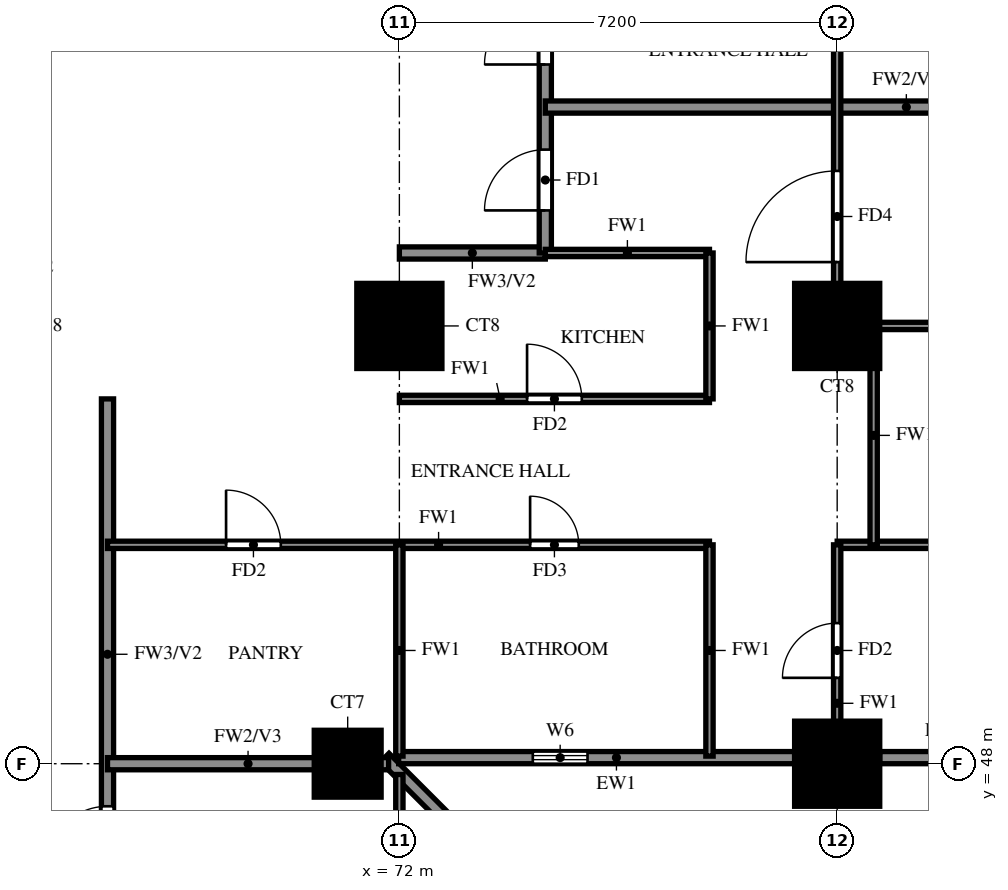
"""IFC4 building model, lengths in metres.
Left out: names, types, materials, properties, quantities, classifications, styles, units other than length and angle.
Written with IfcOpenShell. Run it as: python <this file> out.ifc"""

import sys

from ifc_helpers import new_model, si_unit, direction, frame, frame_2d, origin, origin_2d, place, context, subcontext, project, spatial, rectangle, extrude, source, transform, mapped, element, fill, save


model = new_model("IFC4")
c1 = context("Model", 3, precision=1e-05, world=origin(), true_north=direction((0.0, 1.0)))
c2 = subcontext(c1, "Body", "Model", "MODEL_VIEW")
j1 = project(units=[si_unit("LENGTHUNIT", "METRE"), si_unit("PLANEANGLEUNIT", "RADIAN")], contexts=[c1])
p1 = place(None, origin())
s1 = spatial("IfcSite", under=j1, at=p1, CompositionType="ELEMENT")
p2 = place(p1, origin())
s2 = spatial("IfcBuilding", under=s1, at=p2, CompositionType="ELEMENT")
p3 = place(p2, frame((0.0, 0.0, 34.0)))
s3 = spatial("IfcBuildingStorey", under=s2, at=p3, CompositionType="ELEMENT", Elevation=34.0)
m1 = source(origin(), c2, "Body", "SweptSolid", [
    extrude(rectangle(XDim=1.1, YDim=1.1, at=origin_2d()), origin(), (0.0, 0.0, 1.0), 3.18),
])
p4 = place(p3, frame((71.15, 48.0, 0.0), z_axis=(0.0, 0.0, 1.0), x_axis=(1.0, 0.0, 0.0)))
e1 = element("IfcColumn", 1, at=p4, inside=s3, PredefinedType="COLUMN", context=c2, shape_type="MappedRepresentation", body=[
    mapped(m1, transform((0.0, 0.0, 0.0))),
])
m2 = source(origin(), c2, "Body", "SweptSolid", [
    extrude(rectangle(XDim=1.4, YDim=1.4, at=origin_2d()), origin(), (0.0, 0.0, 1.0), 3.18),
])
for number, where, z_axis, x_axis in (
    (2, (79.2, 48.0, 0.0), (0.0, 0.0, 1.0), (1.0, 0.0, 0.0)),
    (3, (72.0, 55.2, 0.0), (0.0, 0.0, 1.0), (1.0, 0.0, 0.0)),
    (4, (79.2, 55.2, 0.0), (0.0, 0.0, 1.0), (1.0, 0.0, 0.0)),
):
    element("IfcColumn", number, at=place(p3, frame(where, z_axis=z_axis, x_axis=x_axis)), inside=s3, PredefinedType="COLUMN", context=c2, shape_type="MappedRepresentation", body=[
        mapped(m2, transform((0.0, 0.0, 0.0))),
    ])
p5 = place(p3, frame((78.74, 41.118, 0.0), z_axis=(0.0, 0.0, 1.0), x_axis=(-0.707106781187, 0.707106781187, 0.0)))
e5 = element("IfcWall", 5, at=p5, inside=s3, PredefinedType="SOLIDWALL", context=c2, shape_type="SweptSolid", body=[
    extrude(rectangle(XDim=9.874, YDim=0.2, at=frame_2d((4.937, 0.0))), origin(), (0.0, 0.0, 1.0), 3.18),
])
p6 = place(p3, frame((71.989, 48.1, 0.0), z_axis=(0.0, 0.0, 1.0), x_axis=(1.0, 0.0, 0.0)))
e6 = element("IfcWall", 6, at=p6, inside=s3, PredefinedType="SOLIDWALL", context=c2, shape_type="SweptSolid", body=[
    extrude(rectangle(XDim=6.511, YDim=0.2, at=frame_2d((3.256, 0.0))), origin(), (0.0, 0.0, 1.0), 3.18),
])
p7 = place(p6, frame((2.206, 0.0, 1.5)))
e7 = element("IfcOpeningElement", 7, at=p7, cuts=e6, PredefinedType="OPENING", context=c2, shape_type="SweptSolid", body=[
    extrude(rectangle(XDim=0.9, YDim=0.9, at=frame_2d((0.45, 0.45))), frame((0.0, 0.11, 0.0), z_axis=(0.0, -1.0, 0.0), x_axis=(1.0, 0.0, 0.0)), (0.0, 0.0, 1.0), 0.22),
])
p8 = place(p3, frame((79.9, 48.1, 0.0), z_axis=(0.0, 0.0, 1.0), x_axis=(1.0, 0.0, 0.0)))
e8 = element("IfcWall", 8, at=p8, inside=s3, PredefinedType="SOLIDWALL", context=c2, shape_type="SweptSolid", body=[
    extrude(rectangle(XDim=5.35, YDim=0.2, at=frame_2d((2.675, 0.0))), origin(), (0.0, 0.0, 1.0), 3.18),
])
p9 = place(p8, frame((1.475, 0.0, 0.6)))
e9 = element("IfcOpeningElement", 9, at=p9, cuts=e8, PredefinedType="OPENING", context=c2, shape_type="SweptSolid", body=[
    extrude(rectangle(XDim=2.4, YDim=2.4, at=frame_2d((1.2, 1.2))), frame((0.0, 0.11, 0.0), z_axis=(0.0, -1.0, 0.0), x_axis=(1.0, 0.0, 0.0)), (0.0, 0.0, 1.0), 0.22),
])
p10 = place(p3, frame((72.0, 56.4, 0.0), z_axis=(0.0, 0.0, 1.0), x_axis=(1.0, 0.0, 0.0)))
e10 = element("IfcWall", 10, at=p10, inside=s3, PredefinedType="SOLIDWALL", context=c2, shape_type="SweptSolid", body=[
    extrude(rectangle(XDim=2.4, YDim=0.2, at=frame_2d((1.2, 0.0))), origin(), (0.0, 0.0, 1.0), 3.18),
])
p11 = place(p3, frame((67.2, 45.6, 0.0), z_axis=(0.0, 0.0, 1.0), x_axis=(0.0, 1.0, 0.0)))
e11 = element("IfcWall", 11, at=p11, inside=s3, PredefinedType="SOLIDWALL", context=c2, shape_type="SweptSolid", body=[
    extrude(rectangle(XDim=8.4, YDim=0.2, at=frame_2d((4.2, 0.0))), origin(), (0.0, 0.0, 1.0), 3.18),
])
p12 = place(p11, frame((0.7, 0.0, 0.0)))
e12 = element("IfcOpeningElement", 12, at=p12, cuts=e11, PredefinedType="OPENING", context=c2, shape_type="SweptSolid", body=[
    extrude(rectangle(XDim=1.0, YDim=2.1, at=frame_2d((0.5, 1.05))), frame((0.0, 0.11, 0.0), z_axis=(0.0, -1.0, 0.0), x_axis=(1.0, 0.0, 0.0)), (0.0, 0.0, 1.0), 0.22),
])
p13 = place(p3, frame((74.4, 56.4, 0.0), z_axis=(0.0, 0.0, 1.0), x_axis=(0.0, 1.0, 0.0)))
e13 = element("IfcWall", 13, at=p13, inside=s3, PredefinedType="SOLIDWALL", context=c2, shape_type="SweptSolid", body=[
    extrude(rectangle(XDim=9.6, YDim=0.2, at=frame_2d((4.8, 0.0))), origin(), (0.0, 0.0, 1.0), 3.18),
])
p14 = place(p13, frame((0.7, 0.0, 0.0)))
e14 = element("IfcOpeningElement", 14, at=p14, cuts=e13, PredefinedType="OPENING", context=c2, shape_type="SweptSolid", body=[
    extrude(rectangle(XDim=1.0, YDim=2.1, at=frame_2d((0.5, 1.05))), frame((0.0, 0.11, 0.0), z_axis=(0.0, -1.0, 0.0), x_axis=(1.0, 0.0, 0.0)), (0.0, 0.0, 1.0), 0.22),
])
p15 = place(p13, frame((3.1, 0.0, 0.0)))
e15 = element("IfcOpeningElement", 15, at=p15, cuts=e13, PredefinedType="OPENING", context=c2, shape_type="SweptSolid", body=[
    extrude(rectangle(XDim=1.0, YDim=2.1, at=frame_2d((0.5, 1.05))), frame((0.0, 0.11, 0.0), z_axis=(0.0, -1.0, 0.0), x_axis=(1.0, 0.0, 0.0)), (0.0, 0.0, 1.0), 0.22),
])
p16 = place(p3, frame((67.2, 48.0, 0.0), z_axis=(0.0, 0.0, 1.0), x_axis=(1.0, 0.0, 0.0)))
e16 = element("IfcWall", 16, at=p16, inside=s3, PredefinedType="SOLIDWALL", context=c2, shape_type="SweptSolid", body=[
    extrude(rectangle(XDim=4.623, YDim=0.2, at=frame_2d((2.312, 0.0))), origin(), (0.0, 0.0, 1.0), 3.18),
])
p17 = place(p3, frame((74.4, 58.8, 0.0), z_axis=(0.0, 0.0, 1.0), x_axis=(1.0, 0.0, 0.0)))
e17 = element("IfcWall", 17, at=p17, inside=s3, PredefinedType="SOLIDWALL", context=c2, shape_type="SweptSolid", body=[
    extrude(rectangle(XDim=11.875, YDim=0.2, at=frame_2d((5.938, 0.0))), origin(), (0.0, 0.0, 1.0), 2.28),
])
p18 = place(p3, frame((67.2, 51.6, 0.0), z_axis=(0.0, 0.0, 1.0), x_axis=(1.0, 0.0, 0.0)))
e18 = element("IfcWall", 18, at=p18, inside=s3, PredefinedType="PARTITIONING", context=c2, shape_type="SweptSolid", body=[
    extrude(rectangle(XDim=9.9, YDim=0.12, at=frame_2d((4.95, 0.0))), origin(), (0.0, 0.0, 1.0), 3.18),
])
p19 = place(p18, frame((6.95, 0.0, 0.0)))
e19 = element("IfcOpeningElement", 19, at=p19, cuts=e18, PredefinedType="OPENING", context=c2, shape_type="SweptSolid", body=[
    extrude(rectangle(XDim=0.8, YDim=2.1, at=frame_2d((0.4, 1.05))), frame((0.0, 0.07, 0.0), z_axis=(0.0, -1.0, 0.0), x_axis=(1.0, 0.0, 0.0)), (0.0, 0.0, 1.0), 0.14),
])
p20 = place(p18, frame((1.95, 0.0, 0.0)))
e20 = element("IfcOpeningElement", 20, at=p20, cuts=e18, PredefinedType="OPENING", context=c2, shape_type="SweptSolid", body=[
    extrude(rectangle(XDim=0.9, YDim=2.1, at=frame_2d((0.45, 1.05))), frame((0.0, 0.07, 0.0), z_axis=(0.0, -1.0, 0.0), x_axis=(1.0, 0.0, 0.0)), (0.0, 0.0, 1.0), 0.14),
])
p21 = place(p3, frame((79.2, 51.6, 0.0), z_axis=(0.0, 0.0, 1.0), x_axis=(1.0, 0.0, 0.0)))
e21 = element("IfcWall", 21, at=p21, inside=s3, PredefinedType="PARTITIONING", context=c2, shape_type="SweptSolid", body=[
    extrude(rectangle(XDim=7.075, YDim=0.12, at=frame_2d((3.538, 0.0))), origin(), (0.0, 0.0, 1.0), 2.28),
])
p22 = place(p21, frame((3.438, 0.0, 0.0)))
e22 = element("IfcOpeningElement", 22, at=p22, cuts=e21, PredefinedType="OPENING", context=c2, shape_type="SweptSolid", body=[
    extrude(rectangle(XDim=0.8, YDim=2.1, at=frame_2d((0.4, 1.05))), frame((0.0, 0.07, 0.0), z_axis=(0.0, -1.0, 0.0), x_axis=(1.0, 0.0, 0.0)), (0.0, 0.0, 1.0), 0.14),
])
p23 = place(p3, frame((72.0, 54.0, 0.0), z_axis=(0.0, 0.0, 1.0), x_axis=(1.0, 0.0, 0.0)))
e23 = element("IfcWall", 23, at=p23, inside=s3, PredefinedType="PARTITIONING", context=c2, shape_type="SweptSolid", body=[
    extrude(rectangle(XDim=5.1, YDim=0.12, at=frame_2d((2.55, 0.0))), origin(), (0.0, 0.0, 1.0), 3.18),
])
p24 = place(p23, frame((2.1, 0.0, 0.0)))
e24 = element("IfcOpeningElement", 24, at=p24, cuts=e23, PredefinedType="OPENING", context=c2, shape_type="SweptSolid", body=[
    extrude(rectangle(XDim=0.9, YDim=2.1, at=frame_2d((0.45, 1.05))), frame((0.0, 0.07, 0.0), z_axis=(0.0, -1.0, 0.0), x_axis=(1.0, 0.0, 0.0)), (0.0, 0.0, 1.0), 0.14),
])
p25 = place(p3, frame((79.2, 55.2, 0.0), z_axis=(0.0, 0.0, 1.0), x_axis=(1.0, 0.0, 0.0)))
e25 = element("IfcWall", 25, at=p25, inside=s3, PredefinedType="PARTITIONING", context=c2, shape_type="SweptSolid", body=[
    extrude(rectangle(XDim=7.075, YDim=0.12, at=frame_2d((3.538, 0.0))), origin(), (0.0, 0.0, 1.0), 3.18),
])
p26 = place(p3, frame((74.4, 56.4, 0.0), z_axis=(0.0, 0.0, 1.0), x_axis=(1.0, 0.0, 0.0)))
e26 = element("IfcWall", 26, at=p26, inside=s3, PredefinedType="PARTITIONING", context=c2, shape_type="SweptSolid", body=[
    extrude(rectangle(XDim=2.7, YDim=0.12, at=frame_2d((1.35, 0.0))), origin(), (0.0, 0.0, 1.0), 3.18),
])
p27 = place(p3, frame((72.0, 33.725, 0.0), z_axis=(0.0, 0.0, 1.0), x_axis=(0.0, 1.0, 0.0)))
e27 = element("IfcWall", 27, at=p27, inside=s3, PredefinedType="PARTITIONING", context=c2, shape_type="SweptSolid", body=[
    extrude(rectangle(XDim=14.098, YDim=0.12, at=frame_2d((7.049, 0.0))), origin(), (0.0, 0.0, 1.0), 2.28),
])
p28 = place(p27, frame((10.075, 0.0, 0.0)))
e28 = element("IfcOpeningElement", 28, at=p28, cuts=e27, PredefinedType="OPENING", context=c2, shape_type="SweptSolid", body=[
    extrude(rectangle(XDim=0.9, YDim=2.1, at=frame_2d((0.45, 1.05))), frame((0.0, 0.07, 0.0), z_axis=(0.0, -1.0, 0.0), x_axis=(1.0, 0.0, 0.0)), (0.0, 0.0, 1.0), 0.14),
])
for number, where, z_axis, x_axis in (
    (29, (72.0, 48.125, 0.0), (0.0, 0.0, 1.0), (0.0, 1.0, 0.0)),
    (30, (77.1, 48.125, 0.0), (0.0, 0.0, 1.0), (0.0, 1.0, 0.0)),
):
    element("IfcWall", number, at=place(p3, frame(where, z_axis=z_axis, x_axis=x_axis)), inside=s3, PredefinedType="PARTITIONING", context=c2, shape_type="SweptSolid", body=[
        extrude(rectangle(XDim=3.475, YDim=0.12, at=frame_2d((1.738, 0.0))), origin(), (0.0, 0.0, 1.0), 3.18),
    ])
p29 = place(p3, frame((77.1, 54.0, 0.0), z_axis=(0.0, 0.0, 1.0), x_axis=(0.0, 1.0, 0.0)))
e31 = element("IfcWall", 31, at=p29, inside=s3, PredefinedType="PARTITIONING", context=c2, shape_type="SweptSolid", body=[
    extrude(rectangle(XDim=2.4, YDim=0.12, at=frame_2d((1.2, 0.0))), origin(), (0.0, 0.0, 1.0), 3.18),
])
p30 = place(p3, frame((79.2, 48.125, 0.0), z_axis=(0.0, 0.0, 1.0), x_axis=(0.0, 1.0, 0.0)))
e32 = element("IfcWall", 32, at=p30, inside=s3, PredefinedType="PARTITIONING", context=c2, shape_type="SweptSolid", body=[
    extrude(rectangle(XDim=3.475, YDim=0.12, at=frame_2d((1.738, 0.0))), origin(), (0.0, 0.0, 1.0), 3.18),
])
p31 = place(p30, frame((1.288, 0.0, 0.0)))
e33 = element("IfcOpeningElement", 33, at=p31, cuts=e32, PredefinedType="OPENING", context=c2, shape_type="SweptSolid", body=[
    extrude(rectangle(XDim=0.9, YDim=2.1, at=frame_2d((0.45, 1.05))), frame((0.0, 0.07, 0.0), z_axis=(0.0, -1.0, 0.0), x_axis=(1.0, 0.0, 0.0)), (0.0, 0.0, 1.0), 0.14),
])
p32 = place(p3, frame((79.2, 55.2, 0.0), z_axis=(0.0, 0.0, 1.0), x_axis=(0.0, 1.0, 0.0)))
e34 = element("IfcWall", 34, at=p32, inside=s3, PredefinedType="PARTITIONING", context=c2, shape_type="SweptSolid", body=[
    extrude(rectangle(XDim=18.0, YDim=0.12, at=frame_2d((9.0, 0.0))), origin(), (0.0, 0.0, 1.0), 3.18),
])
p33 = place(p32, frame((1.05, 0.0, 0.0)))
e35 = element("IfcOpeningElement", 35, at=p33, cuts=e34, PredefinedType="OPENING", context=c2, shape_type="SweptSolid", body=[
    extrude(rectangle(XDim=1.5, YDim=2.1, at=frame_2d((0.75, 1.05))), frame((0.0, 0.07, 0.0), z_axis=(0.0, -1.0, 0.0), x_axis=(1.0, 0.0, 0.0)), (0.0, 0.0, 1.0), 0.14),
])
p34 = place(p32, frame((4.95, 0.0, 0.0)))
e36 = element("IfcOpeningElement", 36, at=p34, cuts=e34, PredefinedType="OPENING", context=c2, shape_type="SweptSolid", body=[
    extrude(rectangle(XDim=0.9, YDim=2.1, at=frame_2d((0.45, 1.05))), frame((0.0, 0.07, 0.0), z_axis=(0.0, -1.0, 0.0), x_axis=(1.0, 0.0, 0.0)), (0.0, 0.0, 1.0), 0.14),
])
p35 = place(p32, frame((8.55, 0.0, 0.0)))
e37 = element("IfcOpeningElement", 37, at=p35, cuts=e34, PredefinedType="OPENING", context=c2, shape_type="SweptSolid", body=[
    extrude(rectangle(XDim=0.9, YDim=2.1, at=frame_2d((0.45, 1.05))), frame((0.0, 0.07, 0.0), z_axis=(0.0, -1.0, 0.0), x_axis=(1.0, 0.0, 0.0)), (0.0, 0.0, 1.0), 0.14),
])
p36 = place(p32, frame((12.15, 0.0, 0.0)))
e38 = element("IfcOpeningElement", 38, at=p36, cuts=e34, PredefinedType="OPENING", context=c2, shape_type="SweptSolid", body=[
    extrude(rectangle(XDim=0.9, YDim=2.1, at=frame_2d((0.45, 1.05))), frame((0.0, 0.07, 0.0), z_axis=(0.0, -1.0, 0.0), x_axis=(1.0, 0.0, 0.0)), (0.0, 0.0, 1.0), 0.14),
])
p37 = place(p32, frame((15.75, 0.0, 0.0)))
e39 = element("IfcOpeningElement", 39, at=p37, cuts=e34, PredefinedType="OPENING", context=c2, shape_type="SweptSolid", body=[
    extrude(rectangle(XDim=0.9, YDim=2.1, at=frame_2d((0.45, 1.05))), frame((0.0, 0.07, 0.0), z_axis=(0.0, -1.0, 0.0), x_axis=(1.0, 0.0, 0.0)), (0.0, 0.0, 1.0), 0.14),
])
p38 = place(p3, frame((79.8, 51.6, 0.0), z_axis=(0.0, 0.0, 1.0), x_axis=(0.0, 1.0, 0.0)))
e40 = element("IfcWall", 40, at=p38, inside=s3, PredefinedType="PARTITIONING", context=c2, shape_type="SweptSolid", body=[
    extrude(rectangle(XDim=3.6, YDim=0.12, at=frame_2d((1.8, 0.0))), origin(), (0.0, 0.0, 1.0), 3.18),
])
p39 = place(p7, origin())
e41 = element("IfcWindow", 41, at=p39, inside=s3, PartitioningType="SINGLE_PANEL", PredefinedType="WINDOW", context=c2, shape_type="SweptSolid", body=[
    extrude(rectangle(XDim=0.9, YDim=0.9, at=frame_2d((0.45, 0.45))), frame((0.0, 0.03, 0.0), z_axis=(0.0, -1.0, 0.0), x_axis=(1.0, 0.0, 0.0)), (0.0, 0.0, 1.0), 0.06),
])
fill(e7, e41)
p40 = place(p14, origin())
e42 = element("IfcDoor", 42, at=p40, inside=s3, OperationType="SINGLE_SWING_RIGHT", PredefinedType="DOOR", context=c2, shape_type="SweptSolid", body=[
    extrude(rectangle(XDim=1.0, YDim=2.1, at=frame_2d((0.5, 1.05))), frame((0.0, 0.025, 0.0), z_axis=(0.0, -1.0, 0.0), x_axis=(1.0, 0.0, 0.0)), (0.0, 0.0, 1.0), 0.05),
])
fill(e14, e42)
p41 = place(p31, origin())
e43 = element("IfcDoor", 43, at=p41, inside=s3, OperationType="SINGLE_SWING_LEFT", PredefinedType="DOOR", context=c2, shape_type="SweptSolid", body=[
    extrude(rectangle(XDim=0.9, YDim=2.1, at=frame_2d((0.45, 1.05))), frame((0.0, 0.025, 0.0), z_axis=(0.0, -1.0, 0.0), x_axis=(1.0, 0.0, 0.0)), (0.0, 0.0, 1.0), 0.05),
])
fill(e33, e43)
p42 = place(p33, origin())
e44 = element("IfcDoor", 44, at=p42, inside=s3, OperationType="SINGLE_SWING_RIGHT", PredefinedType="DOOR", context=c2, shape_type="SweptSolid", body=[
    extrude(rectangle(XDim=1.5, YDim=2.1, at=frame_2d((0.75, 1.05))), frame((0.0, 0.025, 0.0), z_axis=(0.0, -1.0, 0.0), x_axis=(1.0, 0.0, 0.0)), (0.0, 0.0, 1.0), 0.05),
])
fill(e35, e44)
p43 = place(p19, origin())
e45 = element("IfcDoor", 45, at=p43, inside=s3, OperationType="SINGLE_SWING_LEFT", PredefinedType="DOOR", context=c2, shape_type="SweptSolid", body=[
    extrude(rectangle(XDim=0.8, YDim=2.1, at=frame_2d((0.4, 1.05))), frame((0.0, 0.025, 0.0), z_axis=(0.0, -1.0, 0.0), x_axis=(1.0, 0.0, 0.0)), (0.0, 0.0, 1.0), 0.05),
])
fill(e19, e45)
p44 = place(p24, origin())
e46 = element("IfcDoor", 46, at=p44, inside=s3, OperationType="SINGLE_SWING_LEFT", PredefinedType="DOOR", context=c2, shape_type="SweptSolid", body=[
    extrude(rectangle(XDim=0.9, YDim=2.1, at=frame_2d((0.45, 1.05))), frame((0.0, 0.025, 0.0), z_axis=(0.0, -1.0, 0.0), x_axis=(1.0, 0.0, 0.0)), (0.0, 0.0, 1.0), 0.05),
])
fill(e24, e46)
p45 = place(p20, origin())
e47 = element("IfcDoor", 47, at=p45, inside=s3, OperationType="SINGLE_SWING_RIGHT", PredefinedType="DOOR", context=c2, shape_type="SweptSolid", body=[
    extrude(rectangle(XDim=0.9, YDim=2.1, at=frame_2d((0.45, 1.05))), frame((0.0, 0.025, 0.0), z_axis=(0.0, -1.0, 0.0), x_axis=(1.0, 0.0, 0.0)), (0.0, 0.0, 1.0), 0.05),
])
fill(e20, e47)
p46 = place(p15, origin())
e48 = element("IfcDoor", 48, at=p46, inside=s3, OperationType="SINGLE_SWING_LEFT", PredefinedType="DOOR", context=c2, shape_type="SweptSolid", body=[
    extrude(rectangle(XDim=1.0, YDim=2.1, at=frame_2d((0.5, 1.05))), frame((0.0, 0.025, 0.0), z_axis=(0.0, -1.0, 0.0), x_axis=(1.0, 0.0, 0.0)), (0.0, 0.0, 1.0), 0.05),
])
fill(e15, e48)
p47 = place(p12, origin())
e49 = element("IfcDoor", 49, at=p47, inside=s3, OperationType="SINGLE_SWING_RIGHT", PredefinedType="DOOR", context=c2, shape_type="SweptSolid", body=[
    extrude(rectangle(XDim=1.0, YDim=2.1, at=frame_2d((0.5, 1.05))), frame((0.0, 0.025, 0.0), z_axis=(0.0, -1.0, 0.0), x_axis=(1.0, 0.0, 0.0)), (0.0, 0.0, 1.0), 0.05),
])
fill(e12, e49)
save(model, sys.argv[1])
